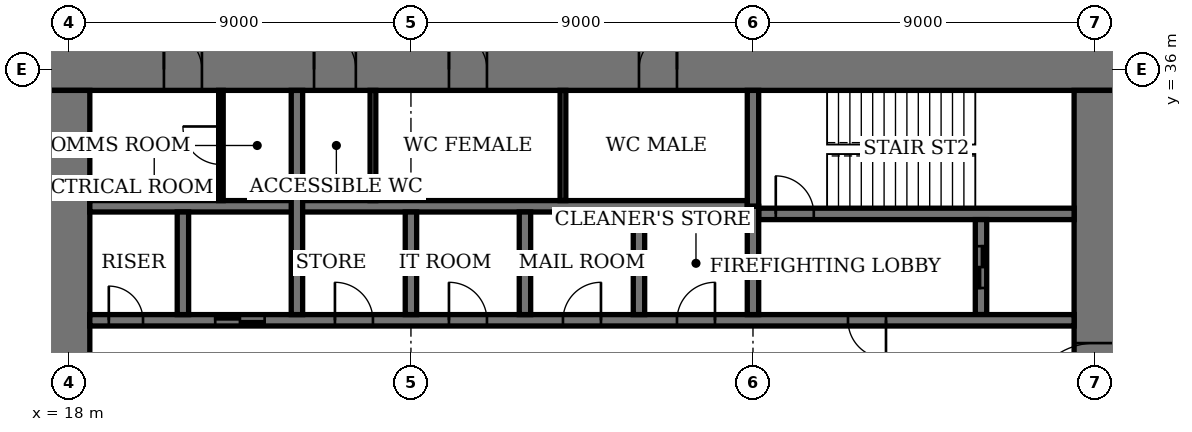
"""IFC4 building model, lengths in metres.
Left out: names, types, materials, properties, quantities, classifications, styles, units other than length and angle.
Written with IfcOpenShell. Run it as: python <this file> out.ifc"""

import sys

from ifc_helpers import new_model, si_unit, direction, frame, frame_2d, origin, place, context, subcontext, project, spatial, rectangle, extrude, element, fill, save


model = new_model("IFC4")
c1 = context("Model", 3, precision=1e-05, world=origin(), true_north=direction((0.0, 1.0)))
c2 = subcontext(c1, "Body", "Model", "MODEL_VIEW")
j1 = project(units=[si_unit("LENGTHUNIT", "METRE"), si_unit("PLANEANGLEUNIT", "RADIAN")], contexts=[c1])
p1 = place(None, origin())
s1 = spatial("IfcSite", under=j1, at=p1, CompositionType="ELEMENT")
p2 = place(p1, origin())
s2 = spatial("IfcBuilding", under=s1, at=p2, CompositionType="ELEMENT")
p3 = place(p2, frame((0.0, 0.0, 255.4)))
s3 = spatial("IfcBuildingStorey", under=s2, at=p3, CompositionType="ELEMENT", Elevation=255.4)
p4 = place(p3, frame((45.55, 36.0, 0.0), z_axis=(0.0, 0.0, 1.0), x_axis=(-1.0, 0.0, 0.0)))
e1 = element("IfcWall", 1, at=p4, inside=s3, PredefinedType="SHEAR", context=c2, shape_type="SweptSolid", body=[
    extrude(rectangle(XDim=28.1, YDim=1.1, at=frame_2d((14.05, 0.0))), origin(), (0.0, 0.0, 1.0), 4.0),
])
p5 = place(p4, frame((11.55, 0.0, 0.0)))
e2 = element("IfcOpeningElement", 2, at=p5, cuts=e1, PredefinedType="OPENING", context=c2, shape_type="SweptSolid", body=[
    extrude(rectangle(XDim=1.0, YDim=2.4, at=frame_2d((0.5, 1.2))), frame((0.0, 0.56, 0.0), z_axis=(0.0, -1.0, 0.0), x_axis=(1.0, 0.0, 0.0)), (0.0, 0.0, 1.0), 1.12),
])
p6 = place(p4, frame((16.55, 0.0, 0.0)))
e3 = element("IfcOpeningElement", 3, at=p6, cuts=e1, PredefinedType="OPENING", context=c2, shape_type="SweptSolid", body=[
    extrude(rectangle(XDim=1.0, YDim=2.4, at=frame_2d((0.5, 1.2))), frame((0.0, 0.56, 0.0), z_axis=(0.0, -1.0, 0.0), x_axis=(1.0, 0.0, 0.0)), (0.0, 0.0, 1.0), 1.12),
])
p7 = place(p4, frame((20.0, 0.0, 0.0)))
e4 = element("IfcOpeningElement", 4, at=p7, cuts=e1, PredefinedType="OPENING", context=c2, shape_type="SweptSolid", body=[
    extrude(rectangle(XDim=1.1, YDim=2.4, at=frame_2d((0.55, 1.2))), frame((0.0, 0.56, 0.0), z_axis=(0.0, -1.0, 0.0), x_axis=(1.0, 0.0, 0.0)), (0.0, 0.0, 1.0), 1.12),
])
p8 = place(p4, frame((24.05, 0.0, 0.0)))
e5 = element("IfcOpeningElement", 5, at=p8, cuts=e1, PredefinedType="OPENING", context=c2, shape_type="SweptSolid", body=[
    extrude(rectangle(XDim=1.0, YDim=2.4, at=frame_2d((0.5, 1.2))), frame((0.0, 0.56, 0.0), z_axis=(0.0, -1.0, 0.0), x_axis=(1.0, 0.0, 0.0)), (0.0, 0.0, 1.0), 1.12),
])
p9 = place(p3, frame((18.0, 35.45, 0.0), z_axis=(0.0, 0.0, 1.0), x_axis=(0.0, -1.0, 0.0)))
e6 = element("IfcWall", 6, at=p9, inside=s3, PredefinedType="SHEAR", context=c2, shape_type="SweptSolid", body=[
    extrude(rectangle(XDim=16.9, YDim=1.1, at=frame_2d((8.45, 0.0))), origin(), (0.0, 0.0, 1.0), 4.0),
])
p10 = place(p9, frame((8.45, 0.0, 0.0)))
e7 = element("IfcOpeningElement", 7, at=p10, cuts=e6, PredefinedType="OPENING", context=c2, shape_type="SweptSolid", body=[
    extrude(rectangle(XDim=1.8, YDim=2.4, at=frame_2d((0.9, 1.2))), frame((0.0, 0.56, 0.0), z_axis=(0.0, -1.0, 0.0), x_axis=(1.0, 0.0, 0.0)), (0.0, 0.0, 1.0), 1.12),
])
p11 = place(p3, frame((45.0, 18.55, 0.0), z_axis=(0.0, 0.0, 1.0), x_axis=(0.0, 1.0, 0.0)))
e8 = element("IfcWall", 8, at=p11, inside=s3, PredefinedType="SHEAR", context=c2, shape_type="SweptSolid", body=[
    extrude(rectangle(XDim=16.9, YDim=1.1, at=frame_2d((8.45, 0.0))), origin(), (0.0, 0.0, 1.0), 4.0),
])
p12 = place(p11, frame((8.45, 0.0, 0.0)))
e9 = element("IfcOpeningElement", 9, at=p12, cuts=e8, PredefinedType="OPENING", context=c2, shape_type="SweptSolid", body=[
    extrude(rectangle(XDim=1.8, YDim=2.4, at=frame_2d((0.9, 1.2))), frame((0.0, 0.56, 0.0), z_axis=(0.0, -1.0, 0.0), x_axis=(1.0, 0.0, 0.0)), (0.0, 0.0, 1.0), 1.12),
])
p13 = place(p3, frame((36.15, 32.2, 0.0), z_axis=(0.0, 0.0, 1.0), x_axis=(1.0, 0.0, 0.0)))
e10 = element("IfcWall", 10, at=p13, inside=s3, PredefinedType="SHEAR", context=c2, shape_type="SweptSolid", body=[
    extrude(rectangle(XDim=8.3, YDim=0.3, at=frame_2d((4.15, 0.0))), origin(), (0.0, 0.0, 1.0), 4.0),
])
p14 = place(p13, frame((0.45, 0.0, 0.0)))
e11 = element("IfcOpeningElement", 11, at=p14, cuts=e10, PredefinedType="OPENING", context=c2, shape_type="SweptSolid", body=[
    extrude(rectangle(XDim=1.0, YDim=2.4, at=frame_2d((0.5, 1.2))), frame((0.0, 0.16, 0.0), z_axis=(0.0, -1.0, 0.0), x_axis=(1.0, 0.0, 0.0)), (0.0, 0.0, 1.0), 0.32),
])
p15 = place(p3, frame((36.0, 32.4, 0.0), z_axis=(0.0, 0.0, 1.0), x_axis=(0.0, 1.0, 0.0)))
e12 = element("IfcWall", 12, at=p15, inside=s3, PredefinedType="SHEAR", context=c2, shape_type="SweptSolid", body=[
    extrude(rectangle(XDim=3.05, YDim=0.3, at=frame_2d((1.525, 0.0))), origin(), (0.0, 0.0, 1.0), 4.0),
])
p16 = place(p3, frame((42.0, 29.55, 0.0), z_axis=(0.0, 0.0, 1.0), x_axis=(0.0, 1.0, 0.0)))
e13 = element("IfcWall", 13, at=p16, inside=s3, PredefinedType="SHEAR", context=c2, shape_type="SweptSolid", body=[
    extrude(rectangle(XDim=2.5, YDim=0.3, at=frame_2d((1.25, 0.0))), origin(), (0.0, 0.0, 1.0), 4.0),
])
p17 = place(p16, frame((0.7, 0.0, 0.0)))
e14 = element("IfcOpeningElement", 14, at=p17, cuts=e13, PredefinedType="OPENING", context=c2, shape_type="SweptSolid", body=[
    extrude(rectangle(XDim=1.1, YDim=2.4, at=frame_2d((0.55, 1.2))), frame((0.0, 0.16, 0.0), z_axis=(0.0, -1.0, 0.0), x_axis=(1.0, 0.0, 0.0)), (0.0, 0.0, 1.0), 0.32),
])
p18 = place(p3, frame((18.55, 29.4, 0.0), z_axis=(0.0, 0.0, 1.0), x_axis=(1.0, 0.0, 0.0)))
e15 = element("IfcWall", 15, at=p18, inside=s3, PredefinedType="SHEAR", context=c2, shape_type="SweptSolid", body=[
    extrude(rectangle(XDim=25.9, YDim=0.3, at=frame_2d((12.95, 0.0))), origin(), (0.0, 0.0, 1.0), 4.0),
])
p19 = place(p18, frame((19.95, 0.0, 0.0)))
e16 = element("IfcOpeningElement", 16, at=p19, cuts=e15, PredefinedType="OPENING", context=c2, shape_type="SweptSolid", body=[
    extrude(rectangle(XDim=1.0, YDim=2.4, at=frame_2d((0.5, 1.2))), frame((0.0, 0.16, 0.0), z_axis=(0.0, -1.0, 0.0), x_axis=(1.0, 0.0, 0.0)), (0.0, 0.0, 1.0), 0.32),
])
p20 = place(p18, frame((0.5, 0.0, 0.0)))
e17 = element("IfcOpeningElement", 17, at=p20, cuts=e15, PredefinedType="OPENING", context=c2, shape_type="SweptSolid", body=[
    extrude(rectangle(XDim=0.9, YDim=2.1, at=frame_2d((0.45, 1.05))), frame((0.0, 0.16, 0.0), z_axis=(0.0, -1.0, 0.0), x_axis=(1.0, 0.0, 0.0)), (0.0, 0.0, 1.0), 0.32),
])
p21 = place(p18, frame((15.45, 0.0, 0.0)))
e18 = element("IfcOpeningElement", 18, at=p21, cuts=e15, PredefinedType="OPENING", context=c2, shape_type="SweptSolid", body=[
    extrude(rectangle(XDim=1.0, YDim=2.4, at=frame_2d((0.5, 1.2))), frame((0.0, 0.16, 0.0), z_axis=(0.0, -1.0, 0.0), x_axis=(1.0, 0.0, 0.0)), (0.0, 0.0, 1.0), 0.32),
])
p22 = place(p18, frame((12.45, 0.0, 0.0)))
e19 = element("IfcOpeningElement", 19, at=p22, cuts=e15, PredefinedType="OPENING", context=c2, shape_type="SweptSolid", body=[
    extrude(rectangle(XDim=1.0, YDim=2.4, at=frame_2d((0.5, 1.2))), frame((0.0, 0.16, 0.0), z_axis=(0.0, -1.0, 0.0), x_axis=(1.0, 0.0, 0.0)), (0.0, 0.0, 1.0), 0.32),
])
p23 = place(p18, frame((9.45, 0.0, 0.0)))
e20 = element("IfcOpeningElement", 20, at=p23, cuts=e15, PredefinedType="OPENING", context=c2, shape_type="SweptSolid", body=[
    extrude(rectangle(XDim=1.0, YDim=2.4, at=frame_2d((0.5, 1.2))), frame((0.0, 0.16, 0.0), z_axis=(0.0, -1.0, 0.0), x_axis=(1.0, 0.0, 0.0)), (0.0, 0.0, 1.0), 0.32),
])
p24 = place(p18, frame((6.45, 0.0, 0.0)))
e21 = element("IfcOpeningElement", 21, at=p24, cuts=e15, PredefinedType="OPENING", context=c2, shape_type="SweptSolid", body=[
    extrude(rectangle(XDim=1.0, YDim=2.4, at=frame_2d((0.5, 1.2))), frame((0.0, 0.16, 0.0), z_axis=(0.0, -1.0, 0.0), x_axis=(1.0, 0.0, 0.0)), (0.0, 0.0, 1.0), 0.32),
])
p25 = place(p18, frame((3.3, 0.0, 0.0)))
e22 = element("IfcOpeningElement", 22, at=p25, cuts=e15, PredefinedType="OPENING", context=c2, shape_type="SweptSolid", body=[
    extrude(rectangle(XDim=1.3, YDim=2.4, at=frame_2d((0.65, 1.2))), frame((0.0, 0.16, 0.0), z_axis=(0.0, -1.0, 0.0), x_axis=(1.0, 0.0, 0.0)), (0.0, 0.0, 1.0), 0.32),
])
p26 = place(p3, frame((18.55, 32.4, 0.0), z_axis=(0.0, 0.0, 1.0), x_axis=(1.0, 0.0, 0.0)))
e23 = element("IfcWall", 23, at=p26, inside=s3, PredefinedType="SHEAR", context=c2, shape_type="SweptSolid", body=[
    extrude(rectangle(XDim=17.3, YDim=0.3, at=frame_2d((8.65, 0.0))), origin(), (0.0, 0.0, 1.0), 4.0),
])
for number, where, z_axis, x_axis in (
    (24, (33.0, 29.55, 0.0), (0.0, 0.0, 1.0), (0.0, 1.0, 0.0)),
    (25, (30.0, 29.55, 0.0), (0.0, 0.0, 1.0), (0.0, 1.0, 0.0)),
    (26, (27.0, 29.55, 0.0), (0.0, 0.0, 1.0), (0.0, 1.0, 0.0)),
):
    element("IfcWall", number, at=place(p3, frame(where, z_axis=z_axis, x_axis=x_axis)), inside=s3, PredefinedType="SHEAR", context=c2, shape_type="SweptSolid", body=[
        extrude(rectangle(XDim=2.7, YDim=0.3, at=frame_2d((1.35, 0.0))), origin(), (0.0, 0.0, 1.0), 4.0),
    ])
p27 = place(p3, frame((24.0, 29.55, 0.0), z_axis=(0.0, 0.0, 1.0), x_axis=(0.0, 1.0, 0.0)))
e27 = element("IfcWall", 27, at=p27, inside=s3, PredefinedType="SHEAR", context=c2, shape_type="SweptSolid", body=[
    extrude(rectangle(XDim=5.9, YDim=0.3, at=frame_2d((2.95, 0.0))), origin(), (0.0, 0.0, 1.0), 4.0),
])
p28 = place(p3, frame((21.0, 29.55, 0.0), z_axis=(0.0, 0.0, 1.0), x_axis=(0.0, 1.0, 0.0)))
e28 = element("IfcWall", 28, at=p28, inside=s3, PredefinedType="SHEAR", context=c2, shape_type="SweptSolid", body=[
    extrude(rectangle(XDim=2.7, YDim=0.3, at=frame_2d((1.35, 0.0))), origin(), (0.0, 0.0, 1.0), 4.0),
])
p29 = place(p3, frame((36.0, 29.55, 0.0), z_axis=(0.0, 0.0, 1.0), x_axis=(0.0, 1.0, 0.0)))
e29 = element("IfcWall", 29, at=p29, inside=s3, PredefinedType="SHEAR", context=c2, shape_type="SweptSolid", body=[
    extrude(rectangle(XDim=2.85, YDim=0.3, at=frame_2d((1.425, 0.0))), origin(), (0.0, 0.0, 1.0), 4.0),
])
for number, where, z_axis, x_axis in (
    (30, (31.0, 32.55, 0.0), (0.0, 0.0, 1.0), (0.0, 1.0, 0.0)),
    (31, (26.0, 32.55, 0.0), (0.0, 0.0, 1.0), (0.0, 1.0, 0.0)),
):
    element("IfcWall", number, at=place(p3, frame(where, z_axis=z_axis, x_axis=x_axis)), inside=s3, PredefinedType="PARTITIONING", context=c2, shape_type="SweptSolid", body=[
        extrude(rectangle(XDim=2.9, YDim=0.15, at=frame_2d((1.45, 0.0))), origin(), (0.0, 0.0, 1.0), 3.75),
    ])
p30 = place(p3, frame((22.0, 32.55, 0.0), z_axis=(0.0, 0.0, 1.0), x_axis=(0.0, 1.0, 0.0)))
e32 = element("IfcWall", 32, at=p30, inside=s3, PredefinedType="PARTITIONING", context=c2, shape_type="SweptSolid", body=[
    extrude(rectangle(XDim=2.9, YDim=0.12, at=frame_2d((1.45, 0.0))), origin(), (0.0, 0.0, 1.0), 3.75),
])
p31 = place(p30, frame((0.95, 0.0, 0.0)))
e33 = element("IfcOpeningElement", 33, at=p31, cuts=e32, PredefinedType="OPENING", context=c2, shape_type="SweptSolid", body=[
    extrude(rectangle(XDim=1.0, YDim=2.4, at=frame_2d((0.5, 1.2))), frame((0.0, 0.07, 0.0), z_axis=(0.0, -1.0, 0.0), x_axis=(1.0, 0.0, 0.0)), (0.0, 0.0, 1.0), 0.14),
])
p32 = place(p12, origin())
e34 = element("IfcDoor", 34, at=p32, inside=s3, OperationType="DOUBLE_DOOR_DOUBLE_SWING", PredefinedType="DOOR", context=c2, shape_type="SweptSolid", body=[
    extrude(rectangle(XDim=1.8, YDim=2.4, at=frame_2d((0.9, 1.2))), frame((0.0, 0.03, 0.0), z_axis=(0.0, -1.0, 0.0), x_axis=(1.0, 0.0, 0.0)), (0.0, 0.0, 1.0), 0.06),
    extrude(rectangle(XDim=0.04, YDim=2.4, at=frame_2d((0.02, 1.2))), frame((0.0, 0.55, 0.0), z_axis=(0.0, -1.0, 0.0), x_axis=(1.0, 0.0, 0.0)), (0.0, 0.0, 1.0), 1.1),
    extrude(rectangle(XDim=0.04, YDim=2.4, at=frame_2d((1.78, 1.2))), frame((0.0, 0.55, 0.0), z_axis=(0.0, -1.0, 0.0), x_axis=(1.0, 0.0, 0.0)), (0.0, 0.0, 1.0), 1.1),
    extrude(rectangle(XDim=1.8, YDim=0.04, at=frame_2d((0.9, 2.38))), frame((0.0, 0.55, 0.0), z_axis=(0.0, -1.0, 0.0), x_axis=(1.0, 0.0, 0.0)), (0.0, 0.0, 1.0), 1.1),
])
fill(e9, e34)
p33 = place(p5, origin())
e35 = element("IfcDoor", 35, at=p33, inside=s3, OperationType="SINGLE_SWING_LEFT", PredefinedType="DOOR", context=c2, shape_type="SweptSolid", body=[
    extrude(rectangle(XDim=1.0, YDim=2.4, at=frame_2d((0.5, 1.2))), frame((0.0, 0.025, 0.0), z_axis=(0.0, -1.0, 0.0), x_axis=(1.0, 0.0, 0.0)), (0.0, 0.0, 1.0), 0.05),
    extrude(rectangle(XDim=0.04, YDim=2.4, at=frame_2d((0.02, 1.2))), frame((0.0, 0.4, 0.0), z_axis=(0.0, -1.0, 0.0), x_axis=(1.0, 0.0, 0.0)), (0.0, 0.0, 1.0), 0.8),
    extrude(rectangle(XDim=0.04, YDim=2.4, at=frame_2d((0.98, 1.2))), frame((0.0, 0.4, 0.0), z_axis=(0.0, -1.0, 0.0), x_axis=(1.0, 0.0, 0.0)), (0.0, 0.0, 1.0), 0.8),
    extrude(rectangle(XDim=1.0, YDim=0.04, at=frame_2d((0.5, 2.38))), frame((0.0, 0.4, 0.0), z_axis=(0.0, -1.0, 0.0), x_axis=(1.0, 0.0, 0.0)), (0.0, 0.0, 1.0), 0.8),
])
fill(e2, e35)
p34 = place(p6, origin())
e36 = element("IfcDoor", 36, at=p34, inside=s3, OperationType="SINGLE_SWING_RIGHT", PredefinedType="DOOR", context=c2, shape_type="SweptSolid", body=[
    extrude(rectangle(XDim=1.0, YDim=2.4, at=frame_2d((0.5, 1.2))), frame((0.0, 0.025, 0.0), z_axis=(0.0, -1.0, 0.0), x_axis=(1.0, 0.0, 0.0)), (0.0, 0.0, 1.0), 0.05),
    extrude(rectangle(XDim=0.04, YDim=2.4, at=frame_2d((0.02, 1.2))), frame((0.0, 0.4, 0.0), z_axis=(0.0, -1.0, 0.0), x_axis=(1.0, 0.0, 0.0)), (0.0, 0.0, 1.0), 0.8),
    extrude(rectangle(XDim=0.04, YDim=2.4, at=frame_2d((0.98, 1.2))), frame((0.0, 0.4, 0.0), z_axis=(0.0, -1.0, 0.0), x_axis=(1.0, 0.0, 0.0)), (0.0, 0.0, 1.0), 0.8),
    extrude(rectangle(XDim=1.0, YDim=0.04, at=frame_2d((0.5, 2.38))), frame((0.0, 0.4, 0.0), z_axis=(0.0, -1.0, 0.0), x_axis=(1.0, 0.0, 0.0)), (0.0, 0.0, 1.0), 0.8),
])
fill(e3, e36)
p35 = place(p7, origin())
e37 = element("IfcDoor", 37, at=p35, inside=s3, OperationType="SINGLE_SWING_RIGHT", PredefinedType="DOOR", context=c2, shape_type="SweptSolid", body=[
    extrude(rectangle(XDim=1.1, YDim=2.4, at=frame_2d((0.55, 1.2))), frame((0.0, 0.025, 0.0), z_axis=(0.0, -1.0, 0.0), x_axis=(1.0, 0.0, 0.0)), (0.0, 0.0, 1.0), 0.05),
    extrude(rectangle(XDim=0.04, YDim=2.4, at=frame_2d((0.02, 1.2))), frame((0.0, 0.44, 0.0), z_axis=(0.0, -1.0, 0.0), x_axis=(1.0, 0.0, 0.0)), (0.0, 0.0, 1.0), 0.88),
    extrude(rectangle(XDim=0.04, YDim=2.4, at=frame_2d((1.08, 1.2))), frame((0.0, 0.44, 0.0), z_axis=(0.0, -1.0, 0.0), x_axis=(1.0, 0.0, 0.0)), (0.0, 0.0, 1.0), 0.88),
    extrude(rectangle(XDim=1.1, YDim=0.04, at=frame_2d((0.55, 2.38))), frame((0.0, 0.44, 0.0), z_axis=(0.0, -1.0, 0.0), x_axis=(1.0, 0.0, 0.0)), (0.0, 0.0, 1.0), 0.88),
])
fill(e4, e37)
p36 = place(p8, origin())
e38 = element("IfcDoor", 38, at=p36, inside=s3, OperationType="SINGLE_SWING_RIGHT", PredefinedType="DOOR", context=c2, shape_type="SweptSolid", body=[
    extrude(rectangle(XDim=1.0, YDim=2.4, at=frame_2d((0.5, 1.2))), frame((0.0, 0.025, 0.0), z_axis=(0.0, -1.0, 0.0), x_axis=(1.0, 0.0, 0.0)), (0.0, 0.0, 1.0), 0.05),
    extrude(rectangle(XDim=0.04, YDim=2.4, at=frame_2d((0.02, 1.2))), frame((0.0, 0.4, 0.0), z_axis=(0.0, -1.0, 0.0), x_axis=(1.0, 0.0, 0.0)), (0.0, 0.0, 1.0), 0.8),
    extrude(rectangle(XDim=0.04, YDim=2.4, at=frame_2d((0.98, 1.2))), frame((0.0, 0.4, 0.0), z_axis=(0.0, -1.0, 0.0), x_axis=(1.0, 0.0, 0.0)), (0.0, 0.0, 1.0), 0.8),
    extrude(rectangle(XDim=1.0, YDim=0.04, at=frame_2d((0.5, 2.38))), frame((0.0, 0.4, 0.0), z_axis=(0.0, -1.0, 0.0), x_axis=(1.0, 0.0, 0.0)), (0.0, 0.0, 1.0), 0.8),
])
fill(e5, e38)
p37 = place(p14, origin())
e39 = element("IfcDoor", 39, at=p37, inside=s3, OperationType="SINGLE_SWING_RIGHT", PredefinedType="DOOR", context=c2, shape_type="SweptSolid", body=[
    extrude(rectangle(XDim=1.0, YDim=2.4, at=frame_2d((0.5, 1.2))), frame((0.0, 0.03, 0.0), z_axis=(0.0, -1.0, 0.0), x_axis=(1.0, 0.0, 0.0)), (0.0, 0.0, 1.0), 0.06),
])
fill(e11, e39)
p38 = place(p19, origin())
e40 = element("IfcDoor", 40, at=p38, inside=s3, OperationType="SINGLE_SWING_RIGHT", PredefinedType="DOOR", context=c2, shape_type="SweptSolid", body=[
    extrude(rectangle(XDim=1.0, YDim=2.4, at=frame_2d((0.5, 1.2))), frame((0.0, 0.03, 0.0), z_axis=(0.0, -1.0, 0.0), x_axis=(1.0, 0.0, 0.0)), (0.0, 0.0, 1.0), 0.06),
])
fill(e16, e40)
p39 = place(p20, origin())
e41 = element("IfcDoor", 41, at=p39, inside=s3, OperationType="SINGLE_SWING_RIGHT", PredefinedType="DOOR", context=c2, shape_type="SweptSolid", body=[
    extrude(rectangle(XDim=0.9, YDim=2.1, at=frame_2d((0.45, 1.05))), frame((0.0, 0.03, 0.0), z_axis=(0.0, -1.0, 0.0), x_axis=(1.0, 0.0, 0.0)), (0.0, 0.0, 1.0), 0.06),
])
fill(e17, e41)
p40 = place(p31, origin())
e42 = element("IfcDoor", 42, at=p40, inside=s3, OperationType="SINGLE_SWING_LEFT", PredefinedType="DOOR", context=c2, shape_type="SweptSolid", body=[
    extrude(rectangle(XDim=1.0, YDim=2.4, at=frame_2d((0.5, 1.2))), frame((0.0, 0.03, 0.0), z_axis=(0.0, -1.0, 0.0), x_axis=(1.0, 0.0, 0.0)), (0.0, 0.0, 1.0), 0.06),
])
fill(e33, e42)
p41 = place(p21, origin())
e43 = element("IfcDoor", 43, at=p41, inside=s3, OperationType="SINGLE_SWING_LEFT", PredefinedType="DOOR", context=c2, shape_type="SweptSolid", body=[
    extrude(rectangle(XDim=1.0, YDim=2.4, at=frame_2d((0.5, 1.2))), frame((0.0, 0.03, 0.0), z_axis=(0.0, -1.0, 0.0), x_axis=(1.0, 0.0, 0.0)), (0.0, 0.0, 1.0), 0.06),
])
fill(e18, e43)
p42 = place(p22, origin())
e44 = element("IfcDoor", 44, at=p42, inside=s3, OperationType="SINGLE_SWING_LEFT", PredefinedType="DOOR", context=c2, shape_type="SweptSolid", body=[
    extrude(rectangle(XDim=1.0, YDim=2.4, at=frame_2d((0.5, 1.2))), frame((0.0, 0.03, 0.0), z_axis=(0.0, -1.0, 0.0), x_axis=(1.0, 0.0, 0.0)), (0.0, 0.0, 1.0), 0.06),
])
fill(e19, e44)
p43 = place(p23, origin())
e45 = element("IfcDoor", 45, at=p43, inside=s3, OperationType="SINGLE_SWING_RIGHT", PredefinedType="DOOR", context=c2, shape_type="SweptSolid", body=[
    extrude(rectangle(XDim=1.0, YDim=2.4, at=frame_2d((0.5, 1.2))), frame((0.0, 0.03, 0.0), z_axis=(0.0, -1.0, 0.0), x_axis=(1.0, 0.0, 0.0)), (0.0, 0.0, 1.0), 0.06),
])
fill(e20, e45)
p44 = place(p24, origin())
e46 = element("IfcDoor", 46, at=p44, inside=s3, OperationType="SINGLE_SWING_RIGHT", PredefinedType="DOOR", context=c2, shape_type="SweptSolid", body=[
    extrude(rectangle(XDim=1.0, YDim=2.4, at=frame_2d((0.5, 1.2))), frame((0.0, 0.03, 0.0), z_axis=(0.0, -1.0, 0.0), x_axis=(1.0, 0.0, 0.0)), (0.0, 0.0, 1.0), 0.06),
])
fill(e21, e46)
p45 = place(p25, origin())
e47 = element("IfcDoor", 47, at=p45, inside=s3, OperationType="DOUBLE_DOOR_SLIDING", PredefinedType="DOOR", context=c2, shape_type="SweptSolid", body=[
    extrude(rectangle(XDim=1.3, YDim=2.4, at=frame_2d((0.65, 1.2))), frame((0.0, 0.02, 0.0), z_axis=(0.0, -1.0, 0.0), x_axis=(1.0, 0.0, 0.0)), (0.0, 0.0, 1.0), 0.04),
])
fill(e22, e47)
p46 = place(p17, origin())
e48 = element("IfcDoor", 48, at=p46, inside=s3, OperationType="DOUBLE_DOOR_SLIDING", PredefinedType="DOOR", context=c2, shape_type="SweptSolid", body=[
    extrude(rectangle(XDim=1.1, YDim=2.4, at=frame_2d((0.55, 1.2))), frame((0.0, 0.03, 0.0), z_axis=(0.0, -1.0, 0.0), x_axis=(1.0, 0.0, 0.0)), (0.0, 0.0, 1.0), 0.06),
])
fill(e14, e48)
save(model, sys.argv[1])
